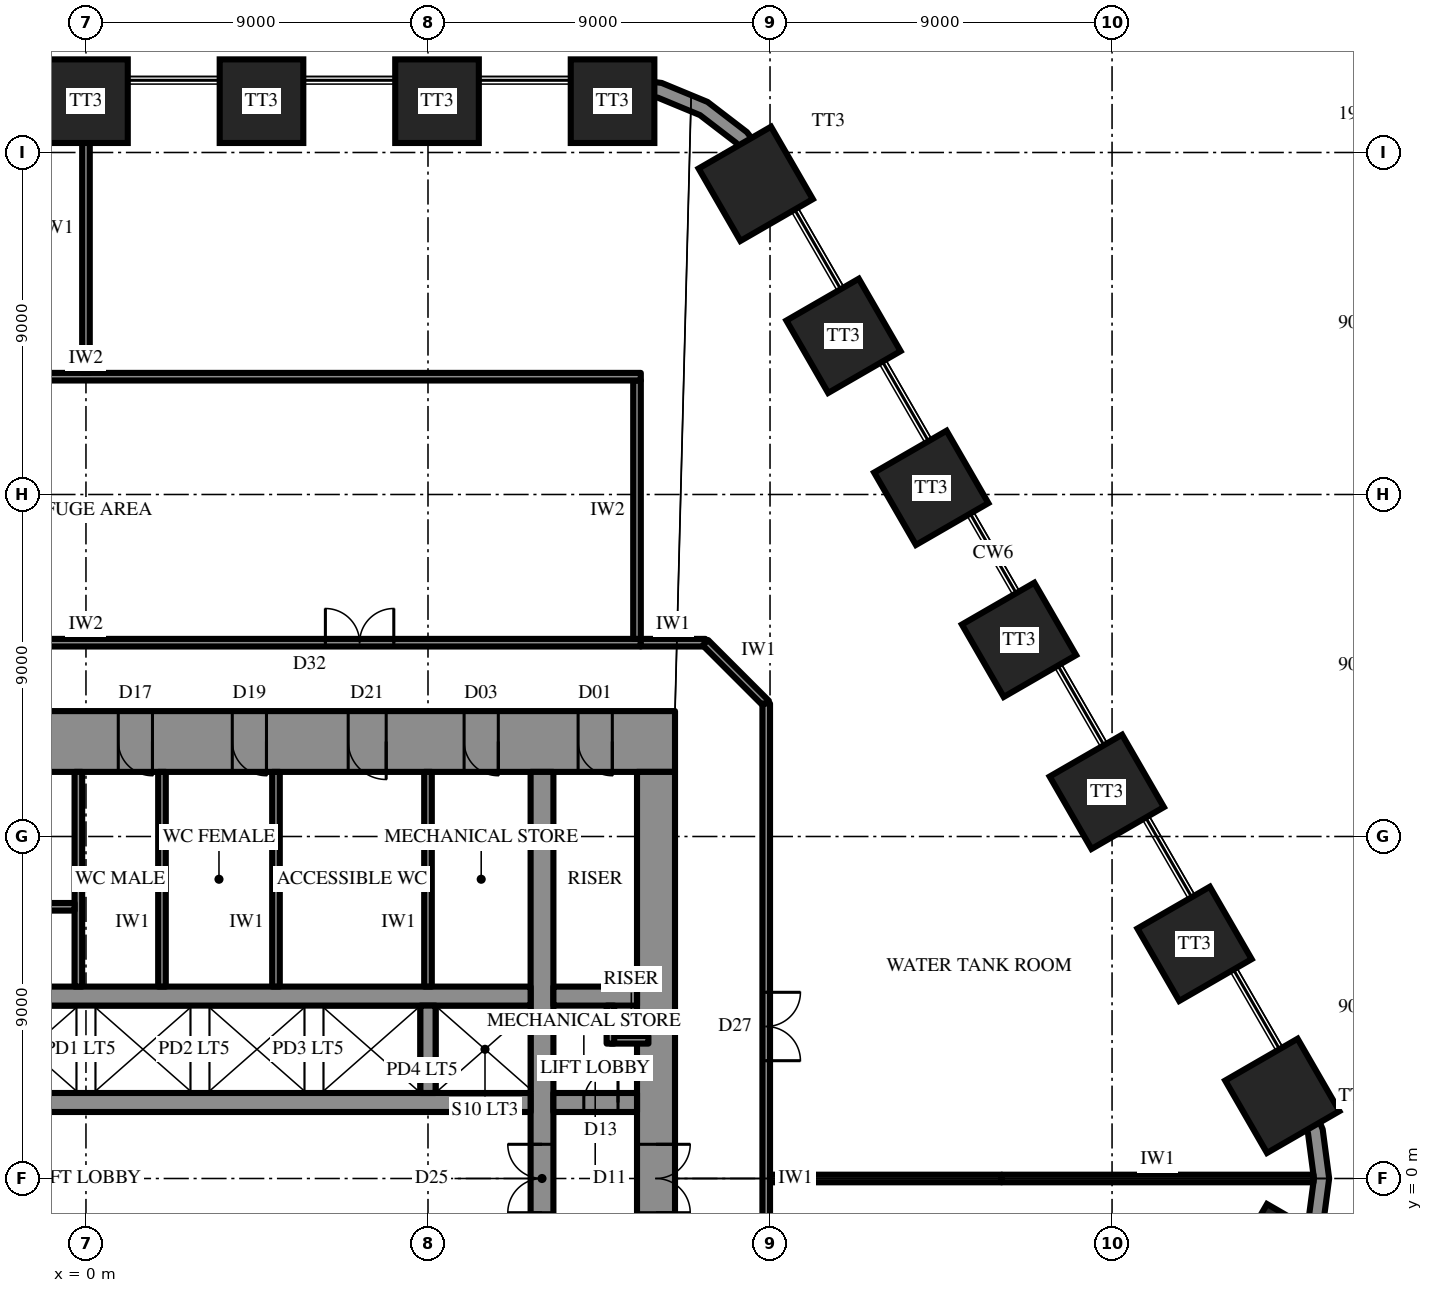
"""IFC4 building model, lengths in metres.
Left out: names, types, materials, properties, quantities, classifications, styles, units other than length and angle.
Written with IfcOpenShell. Run it as: python <this file> out.ifc"""

import sys

from ifc_helpers import new_model, si_unit, direction, frame, frame_2d, origin, origin_2d, place, context, subcontext, project, spatial, polyline, rectangle, outline, extrude, element, fill, save


model = new_model("IFC4")
c1 = context("Model", 3, precision=1e-05, world=origin(), true_north=direction((0.0, 1.0)))
c2 = subcontext(c1, "Body", "Model", "MODEL_VIEW")
j1 = project(units=[si_unit("LENGTHUNIT", "METRE"), si_unit("PLANEANGLEUNIT", "RADIAN")], contexts=[c1])
p1 = place(None, origin())
s1 = spatial("IfcSite", under=j1, at=p1, CompositionType="ELEMENT")
p2 = place(p1, origin())
s2 = spatial("IfcBuilding", under=s1, at=p2, CompositionType="ELEMENT")
p3 = place(p2, frame((0.0, 0.0, 299.5)))
s3 = spatial("IfcBuildingStorey", under=s2, at=p3, CompositionType="ELEMENT", Elevation=299.5)
for number, where, z_axis, x_axis in (
    (1, (31.48, 2.175, 0.0), (0.0, 0.0, 1.0), (-0.5, 0.866, 0.0)),
    (2, (29.171, 6.175, 0.0), (0.0, 0.0, 1.0), (-0.5, 0.866, 0.0)),
    (3, (26.861, 10.175, 0.0), (0.0, 0.0, 1.0), (-0.5, 0.866, 0.0)),
    (4, (24.552, 14.175, 0.0), (0.0, 0.0, 1.0), (-0.5, 0.866, 0.0)),
    (5, (22.242, 18.175, 0.0), (0.0, 0.0, 1.0), (-0.5, 0.866, 0.0)),
    (6, (19.933, 22.175, 0.0), (0.0, 0.0, 1.0), (-0.5, 0.866, 0.0)),
    (7, (17.624, 26.175, 0.0), (0.0, 0.0, 1.0), (-0.5, 0.866, 0.0)),
    (8, (13.856, 28.35, 0.0), (0.0, 0.0, 1.0), (-1.0, 0.0, 0.0)),
    (9, (9.238, 28.35, 0.0), (0.0, 0.0, 1.0), (-1.0, 0.0, 0.0)),
    (10, (4.619, 28.35, 0.0), (0.0, 0.0, 1.0), (-1.0, 0.0, 0.0)),
    (11, (0.0, 28.35, 0.0), (0.0, 0.0, 1.0), (-1.0, 0.0, 0.0)),
    (12, (31.48, -2.175, 0.0), (0.0, 0.0, 1.0), (0.5, 0.866, 0.0)),
):
    element("IfcColumn", number, at=place(p3, frame(where, z_axis=z_axis, x_axis=x_axis)), inside=s3, PredefinedType="COLUMN", context=c2, shape_type="SweptSolid", body=[
        extrude(rectangle(XDim=2.2, YDim=2.2, at=origin_2d()), origin(), (0.0, 0.0, 1.0), 7.0),
    ])
p4 = place(p3, frame((-15.5, 11.5, 0.0), z_axis=(0.0, 0.0, 1.0), x_axis=(1.0, 0.0, 0.0)))
e13 = element("IfcWall", 13, at=p4, inside=s3, PredefinedType="SHEAR", context=c2, shape_type="SweptSolid", body=[
    extrude(rectangle(XDim=31.0, YDim=1.6, at=frame_2d((15.5, 0.0))), origin(), (0.0, 0.0, 1.0), 7.0),
])
p5 = place(p4, frame((16.35, 0.0, 0.0)))
e14 = element("IfcOpeningElement", 14, at=p5, cuts=e13, PredefinedType="OPENING", context=c2, shape_type="SweptSolid", body=[
    extrude(rectangle(XDim=0.9, YDim=2.2, at=frame_2d((0.45, 1.1))), frame((0.0, 0.81, 0.0), z_axis=(0.0, -1.0, 0.0), x_axis=(1.0, 0.0, 0.0)), (0.0, 0.0, 1.0), 1.62),
])
p6 = place(p4, frame((19.35, 0.0, 0.0)))
e15 = element("IfcOpeningElement", 15, at=p6, cuts=e13, PredefinedType="OPENING", context=c2, shape_type="SweptSolid", body=[
    extrude(rectangle(XDim=0.9, YDim=2.2, at=frame_2d((0.45, 1.1))), frame((0.0, 0.81, 0.0), z_axis=(0.0, -1.0, 0.0), x_axis=(1.0, 0.0, 0.0)), (0.0, 0.0, 1.0), 1.62),
])
p7 = place(p4, frame((22.4, 0.0, 0.0)))
e16 = element("IfcOpeningElement", 16, at=p7, cuts=e13, PredefinedType="OPENING", context=c2, shape_type="SweptSolid", body=[
    extrude(rectangle(XDim=1.0, YDim=2.2, at=frame_2d((0.5, 1.1))), frame((0.0, 0.81, 0.0), z_axis=(0.0, -1.0, 0.0), x_axis=(1.0, 0.0, 0.0)), (0.0, 0.0, 1.0), 1.62),
])
p8 = place(p4, frame((1.65, 0.0, 0.0)))
e17 = element("IfcOpeningElement", 17, at=p8, cuts=e13, PredefinedType="OPENING", context=c2, shape_type="SweptSolid", body=[
    extrude(rectangle(XDim=0.9, YDim=2.2, at=frame_2d((0.45, 1.1))), frame((0.0, 0.81, 0.0), z_axis=(0.0, -1.0, 0.0), x_axis=(1.0, 0.0, 0.0)), (0.0, 0.0, 1.0), 1.62),
])
p9 = place(p4, frame((4.65, 0.0, 0.0)))
e18 = element("IfcOpeningElement", 18, at=p9, cuts=e13, PredefinedType="OPENING", context=c2, shape_type="SweptSolid", body=[
    extrude(rectangle(XDim=0.9, YDim=2.2, at=frame_2d((0.45, 1.1))), frame((0.0, 0.81, 0.0), z_axis=(0.0, -1.0, 0.0), x_axis=(1.0, 0.0, 0.0)), (0.0, 0.0, 1.0), 1.62),
])
p10 = place(p4, frame((25.45, 0.0, 0.0)))
e19 = element("IfcOpeningElement", 19, at=p10, cuts=e13, PredefinedType="OPENING", context=c2, shape_type="SweptSolid", body=[
    extrude(rectangle(XDim=0.9, YDim=2.2, at=frame_2d((0.45, 1.1))), frame((0.0, 0.81, 0.0), z_axis=(0.0, -1.0, 0.0), x_axis=(1.0, 0.0, 0.0)), (0.0, 0.0, 1.0), 1.62),
])
p11 = place(p4, frame((28.45, 0.0, 0.0)))
e20 = element("IfcOpeningElement", 20, at=p11, cuts=e13, PredefinedType="OPENING", context=c2, shape_type="SweptSolid", body=[
    extrude(rectangle(XDim=0.9, YDim=2.2, at=frame_2d((0.45, 1.1))), frame((0.0, 0.81, 0.0), z_axis=(0.0, -1.0, 0.0), x_axis=(1.0, 0.0, 0.0)), (0.0, 0.0, 1.0), 1.62),
])
p12 = place(p3, frame((15.0, -10.7, 0.0), z_axis=(0.0, 0.0, 1.0), x_axis=(0.0, 1.0, 0.0)))
e21 = element("IfcWall", 21, at=p12, inside=s3, PredefinedType="SHEAR", context=c2, shape_type="SweptSolid", body=[
    extrude(rectangle(XDim=21.4, YDim=1.0, at=frame_2d((10.7, 0.0))), origin(), (0.0, 0.0, 1.0), 7.0),
])
p13 = place(p12, frame((9.8, 0.0, 0.0)))
e22 = element("IfcOpeningElement", 22, at=p13, cuts=e21, PredefinedType="OPENING", context=c2, shape_type="SweptSolid", body=[
    extrude(rectangle(XDim=1.8, YDim=2.4, at=frame_2d((0.9, 1.2))), frame((0.0, 0.51, 0.0), z_axis=(0.0, -1.0, 0.0), x_axis=(1.0, 0.0, 0.0)), (0.0, 0.0, 1.0), 1.02),
])
p14 = place(p3, frame((12.0, -10.7, 0.0), z_axis=(0.0, 0.0, 1.0), x_axis=(0.0, 1.0, 0.0)))
e23 = element("IfcWall", 23, at=p14, inside=s3, PredefinedType="SHEAR", context=c2, shape_type="SweptSolid", body=[
    extrude(rectangle(XDim=21.4, YDim=0.6, at=frame_2d((10.7, 0.0))), origin(), (0.0, 0.0, 1.0), 7.0),
])
p15 = place(p14, frame((9.8, 0.0, 0.0)))
e24 = element("IfcOpeningElement", 24, at=p15, cuts=e23, PredefinedType="OPENING", context=c2, shape_type="SweptSolid", body=[
    extrude(rectangle(XDim=1.8, YDim=2.4, at=frame_2d((0.9, 1.2))), frame((0.0, 0.31, 0.0), z_axis=(0.0, -1.0, 0.0), x_axis=(1.0, 0.0, 0.0)), (0.0, 0.0, 1.0), 0.62),
])
p16 = place(p3, frame((-3.2, 2.0, 0.0), z_axis=(0.0, 0.0, 1.0), x_axis=(1.0, 0.0, 0.0)))
e25 = element("IfcWall", 25, at=p16, inside=s3, PredefinedType="SHEAR", context=c2, shape_type="SweptSolid", body=[
    extrude(rectangle(XDim=14.9, YDim=0.5, at=frame_2d((7.45, 0.0))), origin(), (0.0, 0.0, 1.0), 7.0),
])
p17 = place(p3, frame((12.3, 2.0, 0.0), z_axis=(0.0, 0.0, 1.0), x_axis=(1.0, 0.0, 0.0)))
e26 = element("IfcWall", 26, at=p17, inside=s3, PredefinedType="SHEAR", context=c2, shape_type="SweptSolid", body=[
    extrude(rectangle(XDim=2.2, YDim=0.5, at=frame_2d((1.1, 0.0))), origin(), (0.0, 0.0, 1.0), 7.0),
])
p18 = place(p17, frame((0.8, 0.0, 0.0)))
e27 = element("IfcOpeningElement", 27, at=p18, cuts=e26, PredefinedType="OPENING", context=c2, shape_type="SweptSolid", body=[
    extrude(rectangle(XDim=0.9, YDim=2.2, at=frame_2d((0.45, 1.1))), frame((0.0, 0.26, 0.0), z_axis=(0.0, -1.0, 0.0), x_axis=(1.0, 0.0, 0.0)), (0.0, 0.0, 1.0), 0.52),
])
p19 = place(p3, frame((-11.7, 4.8, 0.0), z_axis=(0.0, 0.0, 1.0), x_axis=(1.0, 0.0, 0.0)))
e28 = element("IfcWall", 28, at=p19, inside=s3, PredefinedType="SHEAR", context=c2, shape_type="SweptSolid", body=[
    extrude(rectangle(XDim=23.4, YDim=0.5, at=frame_2d((11.7, 0.0))), origin(), (0.0, 0.0, 1.0), 7.0),
])
p20 = place(p19, frame((6.6, 0.0, 0.0)))
e29 = element("IfcOpeningElement", 29, at=p20, cuts=e28, PredefinedType="OPENING", context=c2, shape_type="SweptSolid", body=[
    extrude(rectangle(XDim=1.2, YDim=2.2, at=frame_2d((0.6, 1.1))), frame((0.0, 0.26, 0.0), z_axis=(0.0, -1.0, 0.0), x_axis=(1.0, 0.0, 0.0)), (0.0, 0.0, 1.0), 0.52),
])
p21 = place(p19, frame((3.6, 0.0, 0.0)))
e30 = element("IfcOpeningElement", 30, at=p21, cuts=e28, PredefinedType="OPENING", context=c2, shape_type="SweptSolid", body=[
    extrude(rectangle(XDim=1.2, YDim=2.2, at=frame_2d((0.6, 1.1))), frame((0.0, 0.26, 0.0), z_axis=(0.0, -1.0, 0.0), x_axis=(1.0, 0.0, 0.0)), (0.0, 0.0, 1.0), 0.52),
])
p22 = place(p3, frame((12.3, 4.8, 0.0), z_axis=(0.0, 0.0, 1.0), x_axis=(1.0, 0.0, 0.0)))
e31 = element("IfcWall", 31, at=p22, inside=s3, PredefinedType="SHEAR", context=c2, shape_type="SweptSolid", body=[
    extrude(rectangle(XDim=2.2, YDim=0.5, at=frame_2d((1.1, 0.0))), origin(), (0.0, 0.0, 1.0), 7.0),
])
p23 = place(p3, frame((9.0, 2.25, 0.0), z_axis=(0.0, 0.0, 1.0), x_axis=(0.0, 1.0, 0.0)))
e32 = element("IfcWall", 32, at=p23, inside=s3, PredefinedType="SHEAR", context=c2, shape_type="SweptSolid", body=[
    extrude(rectangle(XDim=2.3, YDim=0.4, at=frame_2d((1.15, 0.0))), origin(), (0.0, 0.0, 1.0), 7.0),
])
p24 = place(p3, frame((-0.2, 5.05, 0.0), z_axis=(0.0, 0.0, 1.0), x_axis=(0.0, 1.0, 0.0)))
e33 = element("IfcWall", 33, at=p24, inside=s3, PredefinedType="SHEAR", context=c2, shape_type="SweptSolid", body=[
    extrude(rectangle(XDim=5.65, YDim=0.2, at=frame_2d((2.825, 0.0))), origin(), (0.0, 0.0, 1.0), 7.0),
])
p25 = place(p3, frame((-8.9, 7.15, 0.0), z_axis=(0.0, 0.0, 1.0), x_axis=(1.0, 0.0, 0.0)))
e34 = element("IfcWall", 34, at=p25, inside=s3, PredefinedType="SHEAR", context=c2, shape_type="SweptSolid", body=[
    extrude(rectangle(XDim=8.6, YDim=0.2, at=frame_2d((4.3, 0.0))), origin(), (0.0, 0.0, 1.0), 7.0),
])
p26 = place(p25, frame((0.3, 0.0, 0.0)))
e35 = element("IfcOpeningElement", 35, at=p26, cuts=e34, PredefinedType="OPENING", context=c2, shape_type="SweptSolid", body=[
    extrude(rectangle(XDim=1.0, YDim=2.2, at=frame_2d((0.5, 1.1))), frame((0.0, 0.11, 0.0), z_axis=(0.0, -1.0, 0.0), x_axis=(1.0, 0.0, 0.0)), (0.0, 0.0, 1.0), 0.22),
])
p27 = place(p3, origin())
e36 = element("IfcWall", 36, at=p27, inside=s3, PredefinedType="SOLIDWALL", context=c2, shape_type="SweptSolid", body=[
    extrude(outline(polyline([(18.187, 26.5), (17.392, 27.536), (16.356, 28.33), (15.15, 28.83), (13.856, 29.0), (13.856, 28.6), (15.047, 28.443), (16.156, 27.984), (17.109, 27.253), (17.84, 26.3), (18.187, 26.5)])), origin(), (0.0, 0.0, 1.0), 4.7),
])
p28 = place(p3, origin())
e37 = element("IfcWall", 37, at=p28, inside=s3, PredefinedType="SOLIDWALL", context=c2, shape_type="SweptSolid", body=[
    extrude(outline(polyline([(32.043, -2.5), (32.542, -1.294), (32.713, 0.0), (32.542, 1.294), (32.043, 2.5), (31.697, 2.3), (32.156, 1.191), (32.313, 0.0), (32.156, -1.191), (31.697, -2.3), (32.043, -2.5)])), origin(), (0.0, 0.0, 1.0), 4.7),
])
for number, where, z_axis, x_axis in (
    (38, (9.0, 5.05, 0.0), (0.0, 0.0, 1.0), (0.0, 1.0, 0.0)),
    (39, (2.0, 5.05, 0.0), (0.0, 0.0, 1.0), (0.0, 1.0, 0.0)),
    (40, (5.0, 5.05, 0.0), (0.0, 0.0, 1.0), (0.0, 1.0, 0.0)),
):
    element("IfcWall", number, at=place(p3, frame(where, z_axis=z_axis, x_axis=x_axis)), inside=s3, PredefinedType="PARTITIONING", context=c2, shape_type="SweptSolid", body=[
        extrude(rectangle(XDim=5.65, YDim=0.2, at=frame_2d((2.825, 0.0))), origin(), (0.0, 0.0, 1.0), 6.7),
    ])
for number, where, z_axis, x_axis in (
    (41, (13.8, 3.65, 0.0), (0.0, 0.0, 1.0), (1.0, 0.0, 0.0)),
    (42, (13.8, 3.55, 0.0), (0.0, 0.0, 1.0), (0.0, 1.0, 0.0)),
):
    element("IfcWall", number, at=place(p3, frame(where, z_axis=z_axis, x_axis=x_axis)), inside=s3, PredefinedType="PARTITIONING", context=c2, shape_type="SweptSolid", body=[
        extrude(rectangle(XDim=1.0, YDim=0.2, at=frame_2d((0.5, 0.0))), origin(), (0.0, 0.0, 1.0), 6.7),
    ])
p29 = place(p3, frame((-14.6, 14.1, 0.0), z_axis=(0.0, 0.0, 1.0), x_axis=(1.0, 0.0, 0.0)))
e43 = element("IfcWall", 43, at=p29, inside=s3, PredefinedType="PARTITIONING", context=c2, shape_type="SweptSolid", body=[
    extrude(rectangle(XDim=29.2, YDim=0.2, at=frame_2d((14.6, 0.0))), origin(), (0.0, 0.0, 1.0), 6.7),
])
p30 = place(p29, frame((6.5, 0.0, 0.0)))
e44 = element("IfcOpeningElement", 44, at=p30, cuts=e43, PredefinedType="OPENING", context=c2, shape_type="SweptSolid", body=[
    extrude(rectangle(XDim=1.8, YDim=2.4, at=frame_2d((0.9, 1.2))), frame((0.0, 0.11, 0.0), z_axis=(0.0, -1.0, 0.0), x_axis=(1.0, 0.0, 0.0)), (0.0, 0.0, 1.0), 0.22),
])
p31 = place(p29, frame((20.9, 0.0, 0.0)))
e45 = element("IfcOpeningElement", 45, at=p31, cuts=e43, PredefinedType="OPENING", context=c2, shape_type="SweptSolid", body=[
    extrude(rectangle(XDim=1.8, YDim=2.4, at=frame_2d((0.9, 1.2))), frame((0.0, 0.11, 0.0), z_axis=(0.0, -1.0, 0.0), x_axis=(1.0, 0.0, 0.0)), (0.0, 0.0, 1.0), 0.22),
])
p32 = place(p3, frame((14.5, 14.2, 0.0), z_axis=(0.0, 0.0, 1.0), x_axis=(0.0, 1.0, 0.0)))
e46 = element("IfcWall", 46, at=p32, inside=s3, PredefinedType="PARTITIONING", context=c2, shape_type="SweptSolid", body=[
    extrude(rectangle(XDim=6.8, YDim=0.2, at=frame_2d((3.4, 0.0))), origin(), (0.0, 0.0, 1.0), 6.7),
])
p33 = place(p3, frame((-14.6, 21.1, 0.0), z_axis=(0.0, 0.0, 1.0), x_axis=(1.0, 0.0, 0.0)))
e47 = element("IfcWall", 47, at=p33, inside=s3, PredefinedType="PARTITIONING", context=c2, shape_type="SweptSolid", body=[
    extrude(rectangle(XDim=29.2, YDim=0.2, at=frame_2d((14.6, 0.0))), origin(), (0.0, 0.0, 1.0), 6.7),
])
p34 = place(p3, frame((14.6, 14.1, 0.0), z_axis=(0.0, 0.0, 1.0), x_axis=(1.0, 0.0, 0.0)))
e48 = element("IfcWall", 48, at=p34, inside=s3, PredefinedType="PARTITIONING", context=c2, shape_type="SweptSolid", body=[
    extrude(rectangle(XDim=1.7, YDim=0.2, at=frame_2d((0.85, 0.0))), origin(), (0.0, 0.0, 1.0), 6.7),
])
p35 = place(p3, frame((16.3, 14.1, 0.0), z_axis=(0.0, 0.0, 1.0), x_axis=(0.707052830339, -0.707160727918, 0.0)))
e49 = element("IfcWall", 49, at=p35, inside=s3, PredefinedType="PARTITIONING", context=c2, shape_type="SweptSolid", body=[
    extrude(rectangle(XDim=2.263, YDim=0.2, at=frame_2d((1.131, 0.0))), origin(), (0.0, 0.0, 1.0), 6.7),
])
p36 = place(p3, frame((17.9, 12.5, 0.0), z_axis=(0.0, 0.0, 1.0), x_axis=(0.0, -1.0, 0.0)))
e50 = element("IfcWall", 50, at=p36, inside=s3, PredefinedType="PARTITIONING", context=c2, shape_type="SweptSolid", body=[
    extrude(rectangle(XDim=25.0, YDim=0.2, at=frame_2d((12.5, 0.0))), origin(), (0.0, 0.0, 1.0), 6.7),
])
p37 = place(p36, frame((7.6, 0.0, 0.0)))
e51 = element("IfcOpeningElement", 51, at=p37, cuts=e50, PredefinedType="OPENING", context=c2, shape_type="SweptSolid", body=[
    extrude(rectangle(XDim=1.8, YDim=2.4, at=frame_2d((0.9, 1.2))), frame((0.0, 0.11, 0.0), z_axis=(0.0, -1.0, 0.0), x_axis=(1.0, 0.0, 0.0)), (0.0, 0.0, 1.0), 0.22),
])
p38 = place(p36, frame((15.6, 0.0, 0.0)))
e52 = element("IfcOpeningElement", 52, at=p38, cuts=e50, PredefinedType="OPENING", context=c2, shape_type="SweptSolid", body=[
    extrude(rectangle(XDim=1.8, YDim=2.4, at=frame_2d((0.9, 1.2))), frame((0.0, 0.11, 0.0), z_axis=(0.0, -1.0, 0.0), x_axis=(1.0, 0.0, 0.0)), (0.0, 0.0, 1.0), 0.22),
])
p39 = place(p3, frame((0.0, 21.2, 0.0), z_axis=(0.0, 0.0, 1.0), x_axis=(0.0, 1.0, 0.0)))
e53 = element("IfcWall", 53, at=p39, inside=s3, PredefinedType="PARTITIONING", context=c2, shape_type="SweptSolid", body=[
    extrude(rectangle(XDim=7.61, YDim=0.2, at=frame_2d((3.805, 0.0))), origin(), (0.0, 0.0, 1.0), 2.7),
])
p40 = place(p3, frame((18.0, 0.0, 0.0), z_axis=(0.0, 0.0, 1.0), x_axis=(1.0, 0.0, 0.0)))
e54 = element("IfcWall", 54, at=p40, inside=s3, PredefinedType="PARTITIONING", context=c2, shape_type="SweptSolid", body=[
    extrude(rectangle(XDim=6.096, YDim=0.2, at=frame_2d((3.048, 0.0))), origin(), (0.0, 0.0, 1.0), 2.7),
])
p41 = place(p3, frame((24.096, 0.0, 0.0), z_axis=(0.0, 0.0, 1.0), x_axis=(1.0, 0.0, 0.0)))
e55 = element("IfcWall", 55, at=p41, inside=s3, PredefinedType="PARTITIONING", context=c2, shape_type="SweptSolid", body=[
    extrude(rectangle(XDim=8.204, YDim=0.2, at=frame_2d((4.102, 0.0))), origin(), (0.0, 0.0, 1.0), 6.7),
])
p42 = place(p13, frame((1.8, 0.0, 0.0), z_axis=(0.0, 0.0, 1.0), x_axis=(-1.0, 0.0, 0.0)))
e56 = element("IfcDoor", 56, at=p42, inside=s3, OperationType="DOUBLE_DOOR_SINGLE_SWING", PredefinedType="DOOR", context=c2, shape_type="SweptSolid", body=[
    extrude(rectangle(XDim=1.8, YDim=2.4, at=frame_2d((0.9, 1.2))), frame((0.0, 0.025, 0.0), z_axis=(0.0, -1.0, 0.0), x_axis=(1.0, 0.0, 0.0)), (0.0, 0.0, 1.0), 0.05),
])
fill(e22, e56)
p43 = place(p5, frame((0.9, 0.0, 0.0), z_axis=(0.0, 0.0, 1.0), x_axis=(-1.0, 0.0, 0.0)))
e57 = element("IfcDoor", 57, at=p43, inside=s3, OperationType="SINGLE_SWING_RIGHT", PredefinedType="DOOR", context=c2, shape_type="SweptSolid", body=[
    extrude(rectangle(XDim=0.9, YDim=2.2, at=frame_2d((0.45, 1.1))), frame((0.0, 0.025, 0.0), z_axis=(0.0, -1.0, 0.0), x_axis=(1.0, 0.0, 0.0)), (0.0, 0.0, 1.0), 0.05),
])
fill(e14, e57)
p44 = place(p6, frame((0.9, 0.0, 0.0), z_axis=(0.0, 0.0, 1.0), x_axis=(-1.0, 0.0, 0.0)))
e58 = element("IfcDoor", 58, at=p44, inside=s3, OperationType="SINGLE_SWING_RIGHT", PredefinedType="DOOR", context=c2, shape_type="SweptSolid", body=[
    extrude(rectangle(XDim=0.9, YDim=2.2, at=frame_2d((0.45, 1.1))), frame((0.0, 0.025, 0.0), z_axis=(0.0, -1.0, 0.0), x_axis=(1.0, 0.0, 0.0)), (0.0, 0.0, 1.0), 0.05),
])
fill(e15, e58)
p45 = place(p7, frame((1.0, 0.0, 0.0), z_axis=(0.0, 0.0, 1.0), x_axis=(-1.0, 0.0, 0.0)))
e59 = element("IfcDoor", 59, at=p45, inside=s3, OperationType="SINGLE_SWING_RIGHT", PredefinedType="DOOR", context=c2, shape_type="SweptSolid", body=[
    extrude(rectangle(XDim=1.0, YDim=2.2, at=frame_2d((0.5, 1.1))), frame((0.0, 0.025, 0.0), z_axis=(0.0, -1.0, 0.0), x_axis=(1.0, 0.0, 0.0)), (0.0, 0.0, 1.0), 0.05),
])
fill(e16, e59)
p46 = place(p10, frame((0.9, 0.0, 0.0), z_axis=(0.0, 0.0, 1.0), x_axis=(-1.0, 0.0, 0.0)))
e60 = element("IfcDoor", 60, at=p46, inside=s3, OperationType="SINGLE_SWING_RIGHT", PredefinedType="DOOR", context=c2, shape_type="SweptSolid", body=[
    extrude(rectangle(XDim=0.9, YDim=2.2, at=frame_2d((0.45, 1.1))), frame((0.0, 0.025, 0.0), z_axis=(0.0, -1.0, 0.0), x_axis=(1.0, 0.0, 0.0)), (0.0, 0.0, 1.0), 0.05),
])
fill(e19, e60)
p47 = place(p11, frame((0.9, 0.0, 0.0), z_axis=(0.0, 0.0, 1.0), x_axis=(-1.0, 0.0, 0.0)))
e61 = element("IfcDoor", 61, at=p47, inside=s3, OperationType="SINGLE_SWING_RIGHT", PredefinedType="DOOR", context=c2, shape_type="SweptSolid", body=[
    extrude(rectangle(XDim=0.9, YDim=2.2, at=frame_2d((0.45, 1.1))), frame((0.0, 0.025, 0.0), z_axis=(0.0, -1.0, 0.0), x_axis=(1.0, 0.0, 0.0)), (0.0, 0.0, 1.0), 0.05),
])
fill(e20, e61)
p48 = place(p18, origin())
e62 = element("IfcDoor", 62, at=p48, inside=s3, OperationType="SINGLE_SWING_LEFT", PredefinedType="DOOR", context=c2, shape_type="SweptSolid", body=[
    extrude(rectangle(XDim=0.9, YDim=2.2, at=frame_2d((0.45, 1.1))), frame((0.0, 0.025, 0.0), z_axis=(0.0, -1.0, 0.0), x_axis=(1.0, 0.0, 0.0)), (0.0, 0.0, 1.0), 0.05),
])
fill(e27, e62)
p49 = place(p15, origin())
e63 = element("IfcDoor", 63, at=p49, inside=s3, OperationType="DOUBLE_DOOR_SINGLE_SWING", PredefinedType="DOOR", context=c2, shape_type="SweptSolid", body=[
    extrude(rectangle(XDim=1.8, YDim=2.4, at=frame_2d((0.9, 1.2))), frame((0.0, 0.025, 0.0), z_axis=(0.0, -1.0, 0.0), x_axis=(1.0, 0.0, 0.0)), (0.0, 0.0, 1.0), 0.05),
])
fill(e24, e63)
p50 = place(p31, origin())
e64 = element("IfcDoor", 64, at=p50, inside=s3, OperationType="DOUBLE_DOOR_SINGLE_SWING", PredefinedType="DOOR", context=c2, shape_type="SweptSolid", body=[
    extrude(rectangle(XDim=1.8, YDim=2.4, at=frame_2d((0.9, 1.2))), frame((0.0, 0.025, 0.0), z_axis=(0.0, -1.0, 0.0), x_axis=(1.0, 0.0, 0.0)), (0.0, 0.0, 1.0), 0.05),
])
fill(e45, e64)
p51 = place(p37, origin())
e65 = element("IfcDoor", 65, at=p51, inside=s3, OperationType="DOUBLE_DOOR_SINGLE_SWING", PredefinedType="DOOR", context=c2, shape_type="SweptSolid", body=[
    extrude(rectangle(XDim=1.8, YDim=2.4, at=frame_2d((0.9, 1.2))), frame((0.0, 0.025, 0.0), z_axis=(0.0, -1.0, 0.0), x_axis=(1.0, 0.0, 0.0)), (0.0, 0.0, 1.0), 0.05),
])
fill(e51, e65)
save(model, sys.argv[1])
